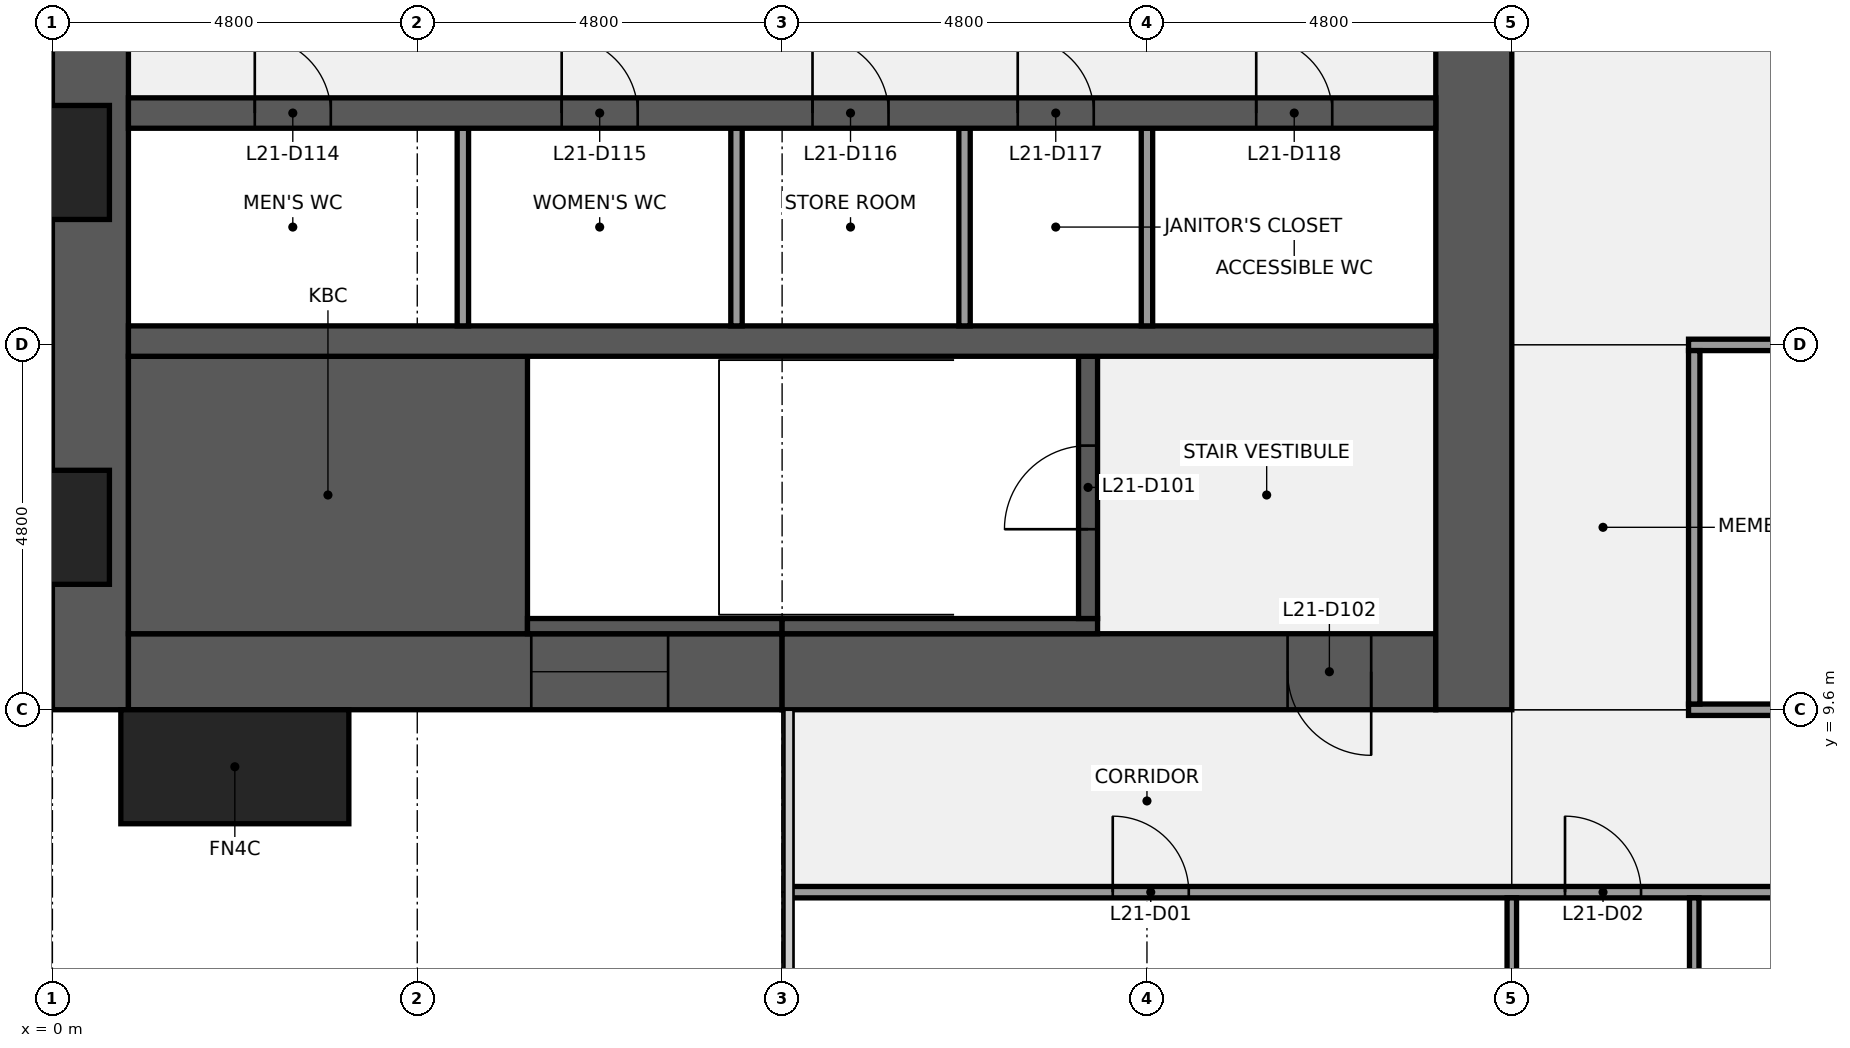
"""IFC4 building model, lengths in metres.
Left out: names, types, materials, properties, quantities, classifications, styles, units other than length and angle.
Written with IfcOpenShell. Run it as: python <this file> out.ifc"""

import sys

from ifc_helpers import new_model, si_unit, direction, frame, frame_2d, origin, origin_2d, place, context, subcontext, project, spatial, rectangle, extrude, element, fill, save


model = new_model("IFC4")
c1 = context("Model", 3, precision=1e-05, world=origin(), true_north=direction((0.0, 1.0)))
c2 = subcontext(c1, "Body", "Model", "MODEL_VIEW")
j1 = project(units=[si_unit("LENGTHUNIT", "METRE"), si_unit("PLANEANGLEUNIT", "RADIAN")], contexts=[c1])
p1 = place(None, origin())
s1 = spatial("IfcSite", under=j1, at=p1, CompositionType="ELEMENT")
p2 = place(p1, origin())
s2 = spatial("IfcBuilding", under=s1, at=p2, CompositionType="ELEMENT")
p3 = place(p2, frame((0.0, 0.0, 104.1)))
s3 = spatial("IfcBuildingStorey", under=s2, at=p3, CompositionType="ELEMENT", Elevation=104.1)
p4 = place(p3, frame((0.5, 9.6, 0.0), z_axis=(0.0, 0.0, 1.0), x_axis=(0.0, 1.0, 0.0)))
e1 = element("IfcWall", 1, at=p4, inside=s3, PredefinedType="SHEAR", context=c2, shape_type="SweptSolid", body=[
    extrude(rectangle(XDim=28.8, YDim=1.0, at=frame_2d((14.4, 0.0))), origin(), (0.0, 0.0, 1.0), 3.84),
])
p5 = place(p4, frame((8.85, 0.0, 0.9)))
e2 = element("IfcOpeningElement", 2, at=p5, cuts=e1, PredefinedType="OPENING", context=c2, shape_type="SweptSolid", body=[
    extrude(rectangle(XDim=1.5, YDim=1.5, at=frame_2d((0.75, 0.75))), frame((0.0, 0.51, 0.0), z_axis=(0.0, -1.0, 0.0), x_axis=(1.0, 0.0, 0.0)), (0.0, 0.0, 1.0), 1.02),
])
p6 = place(p4, frame((18.45, 0.0, 0.9)))
e3 = element("IfcOpeningElement", 3, at=p6, cuts=e1, PredefinedType="OPENING", context=c2, shape_type="SweptSolid", body=[
    extrude(rectangle(XDim=1.5, YDim=1.5, at=frame_2d((0.75, 0.75))), frame((0.0, 0.51, 0.0), z_axis=(0.0, -1.0, 0.0), x_axis=(1.0, 0.0, 0.0)), (0.0, 0.0, 1.0), 1.02),
])
p7 = place(p3, frame((9.6, 10.1, 0.0), z_axis=(0.0, 0.0, 1.0), x_axis=(-1.0, 0.0, 0.0)))
e4 = element("IfcWall", 4, at=p7, inside=s3, PredefinedType="SHEAR", context=c2, shape_type="SweptSolid", body=[
    extrude(rectangle(XDim=8.6, YDim=1.0, at=frame_2d((4.3, 0.0))), origin(), (0.0, 0.0, 1.0), 3.84),
])
p8 = place(p7, frame((1.5, 0.0, 0.9)))
e5 = element("IfcOpeningElement", 5, at=p8, cuts=e4, PredefinedType="OPENING", context=c2, shape_type="SweptSolid", body=[
    extrude(rectangle(XDim=1.8, YDim=1.5, at=frame_2d((0.9, 0.75))), frame((0.0, 0.51, 0.0), z_axis=(0.0, -1.0, 0.0), x_axis=(1.0, 0.0, 0.0)), (0.0, 0.0, 1.0), 1.02),
])
p9 = place(p3, frame((18.2, 10.1, 0.0), z_axis=(0.0, 0.0, 1.0), x_axis=(-1.0, 0.0, 0.0)))
e6 = element("IfcWall", 6, at=p9, inside=s3, PredefinedType="SHEAR", context=c2, shape_type="SweptSolid", body=[
    extrude(rectangle(XDim=8.6, YDim=1.0, at=frame_2d((4.3, 0.0))), origin(), (0.0, 0.0, 1.0), 3.84),
])
p10 = place(p9, frame((0.85, 0.0, 0.0)))
e7 = element("IfcOpeningElement", 7, at=p10, cuts=e6, PredefinedType="OPENING", context=c2, shape_type="SweptSolid", body=[
    extrude(rectangle(XDim=1.1, YDim=2.1, at=frame_2d((0.55, 1.05))), frame((0.0, 0.51, 0.0), z_axis=(0.0, -1.0, 0.0), x_axis=(1.0, 0.0, 0.0)), (0.0, 0.0, 1.0), 1.02),
])
p11 = place(p3, frame((18.7, 38.4, 0.0), z_axis=(0.0, 0.0, 1.0), x_axis=(0.0, -1.0, 0.0)))
e8 = element("IfcWall", 8, at=p11, inside=s3, PredefinedType="SHEAR", context=c2, shape_type="SweptSolid", body=[
    extrude(rectangle(XDim=28.8, YDim=1.0, at=frame_2d((14.4, 0.0))), origin(), (0.0, 0.0, 1.0), 3.84),
])
p12 = place(p11, frame((18.3, 0.0, 0.0)))
e9 = element("IfcOpeningElement", 9, at=p12, cuts=e8, PredefinedType="OPENING", context=c2, shape_type="SweptSolid", body=[
    extrude(rectangle(XDim=1.8, YDim=2.1, at=frame_2d((0.9, 1.05))), frame((0.0, 0.51, 0.0), z_axis=(0.0, -1.0, 0.0), x_axis=(1.0, 0.0, 0.0)), (0.0, 0.0, 1.0), 1.02),
])
p13 = place(p11, frame((8.7, 0.0, 0.0)))
e10 = element("IfcOpeningElement", 10, at=p13, cuts=e8, PredefinedType="OPENING", context=c2, shape_type="SweptSolid", body=[
    extrude(rectangle(XDim=1.8, YDim=2.1, at=frame_2d((0.9, 1.05))), frame((0.0, 0.51, 0.0), z_axis=(0.0, -1.0, 0.0), x_axis=(1.0, 0.0, 0.0)), (0.0, 0.0, 1.0), 1.02),
])
p14 = place(p3, frame((1.0, 12.425, 0.0), z_axis=(0.0, 0.0, 1.0), x_axis=(1.0, 0.0, 0.0)))
e11 = element("IfcWall", 11, at=p14, inside=s3, PredefinedType="SHEAR", context=c2, shape_type="SweptSolid", body=[
    extrude(rectangle(XDim=5.25, YDim=3.65, at=frame_2d((2.625, 0.0))), origin(), (0.0, 0.0, 1.0), 3.84),
])
p15 = place(p3, frame((6.25, 10.7, 0.0), z_axis=(0.0, 0.0, 1.0), x_axis=(1.0, 0.0, 0.0)))
e12 = element("IfcWall", 12, at=p15, inside=s3, PredefinedType="SHEAR", context=c2, shape_type="SweptSolid", body=[
    extrude(rectangle(XDim=3.35, YDim=0.2, at=frame_2d((1.675, 0.0))), origin(), (0.0, 0.0, 1.0), 3.84),
])
p16 = place(p3, frame((9.6, 10.7, 0.0), z_axis=(0.0, 0.0, 1.0), x_axis=(1.0, 0.0, 0.0)))
e13 = element("IfcWall", 13, at=p16, inside=s3, PredefinedType="SHEAR", context=c2, shape_type="SweptSolid", body=[
    extrude(rectangle(XDim=4.15, YDim=0.2, at=frame_2d((2.075, 0.0))), origin(), (0.0, 0.0, 1.0), 3.84),
])
p17 = place(p3, frame((13.625, 10.8, 0.0), z_axis=(0.0, 0.0, 1.0), x_axis=(0.0, 1.0, 0.0)))
e14 = element("IfcWall", 14, at=p17, inside=s3, PredefinedType="SHEAR", context=c2, shape_type="SweptSolid", body=[
    extrude(rectangle(XDim=3.45, YDim=0.25, at=frame_2d((1.725, 0.0))), origin(), (0.0, 0.0, 1.0), 3.84),
])
p18 = place(p17, frame((1.175, 0.0, 0.0)))
e15 = element("IfcOpeningElement", 15, at=p18, cuts=e14, PredefinedType="OPENING", context=c2, shape_type="SweptSolid", body=[
    extrude(rectangle(XDim=1.1, YDim=2.1, at=frame_2d((0.55, 1.05))), frame((0.0, 0.135, 0.0), z_axis=(0.0, -1.0, 0.0), x_axis=(1.0, 0.0, 0.0)), (0.0, 0.0, 1.0), 0.27),
])
p19 = place(p3, frame((1.0, 14.45, 0.0), z_axis=(0.0, 0.0, 1.0), x_axis=(1.0, 0.0, 0.0)))
e16 = element("IfcWall", 16, at=p19, inside=s3, PredefinedType="SHEAR", context=c2, shape_type="SweptSolid", body=[
    extrude(rectangle(XDim=17.2, YDim=0.4, at=frame_2d((8.6, 0.0))), origin(), (0.0, 0.0, 1.0), 3.84),
])
for number, where, z_axis, x_axis in (
    (17, (5.4, 14.65, 0.0), (0.0, 0.0, 1.0), (0.0, 1.0, 0.0)),
    (18, (9.0, 14.65, 0.0), (0.0, 0.0, 1.0), (0.0, 1.0, 0.0)),
    (19, (12.0, 14.65, 0.0), (0.0, 0.0, 1.0), (0.0, 1.0, 0.0)),
    (20, (14.4, 14.65, 0.0), (0.0, 0.0, 1.0), (0.0, 1.0, 0.0)),
):
    element("IfcWall", number, at=place(p3, frame(where, z_axis=z_axis, x_axis=x_axis)), inside=s3, PredefinedType="PARTITIONING", context=c2, shape_type="SweptSolid", body=[
        extrude(rectangle(XDim=2.6, YDim=0.15, at=frame_2d((1.3, 0.0))), origin(), (0.0, 0.0, 1.0), 3.84),
    ])
p20 = place(p3, frame((1.0, 17.45, 0.0), z_axis=(0.0, 0.0, 1.0), x_axis=(1.0, 0.0, 0.0)))
e21 = element("IfcWall", 21, at=p20, inside=s3, PredefinedType="SHEAR", context=c2, shape_type="SweptSolid", body=[
    extrude(rectangle(XDim=17.2, YDim=0.4, at=frame_2d((8.6, 0.0))), origin(), (0.0, 0.0, 1.0), 3.84),
])
p21 = place(p20, frame((1.663, 0.0, 0.0)))
e22 = element("IfcOpeningElement", 22, at=p21, cuts=e21, PredefinedType="OPENING", context=c2, shape_type="SweptSolid", body=[
    extrude(rectangle(XDim=1.0, YDim=2.1, at=frame_2d((0.5, 1.05))), frame((0.0, 0.21, 0.0), z_axis=(0.0, -1.0, 0.0), x_axis=(1.0, 0.0, 0.0)), (0.0, 0.0, 1.0), 0.42),
])
p22 = place(p20, frame((5.7, 0.0, 0.0)))
e23 = element("IfcOpeningElement", 23, at=p22, cuts=e21, PredefinedType="OPENING", context=c2, shape_type="SweptSolid", body=[
    extrude(rectangle(XDim=1.0, YDim=2.1, at=frame_2d((0.5, 1.05))), frame((0.0, 0.21, 0.0), z_axis=(0.0, -1.0, 0.0), x_axis=(1.0, 0.0, 0.0)), (0.0, 0.0, 1.0), 0.42),
])
p23 = place(p20, frame((9.0, 0.0, 0.0)))
e24 = element("IfcOpeningElement", 24, at=p23, cuts=e21, PredefinedType="OPENING", context=c2, shape_type="SweptSolid", body=[
    extrude(rectangle(XDim=1.0, YDim=2.1, at=frame_2d((0.5, 1.05))), frame((0.0, 0.21, 0.0), z_axis=(0.0, -1.0, 0.0), x_axis=(1.0, 0.0, 0.0)), (0.0, 0.0, 1.0), 0.42),
])
p24 = place(p20, frame((11.7, 0.0, 0.0)))
e25 = element("IfcOpeningElement", 25, at=p24, cuts=e21, PredefinedType="OPENING", context=c2, shape_type="SweptSolid", body=[
    extrude(rectangle(XDim=1.0, YDim=2.1, at=frame_2d((0.5, 1.05))), frame((0.0, 0.21, 0.0), z_axis=(0.0, -1.0, 0.0), x_axis=(1.0, 0.0, 0.0)), (0.0, 0.0, 1.0), 0.42),
])
p25 = place(p20, frame((14.837, 0.0, 0.0)))
e26 = element("IfcOpeningElement", 26, at=p25, cuts=e21, PredefinedType="OPENING", context=c2, shape_type="SweptSolid", body=[
    extrude(rectangle(XDim=1.0, YDim=2.1, at=frame_2d((0.5, 1.05))), frame((0.0, 0.21, 0.0), z_axis=(0.0, -1.0, 0.0), x_axis=(1.0, 0.0, 0.0)), (0.0, 0.0, 1.0), 0.42),
])
p26 = place(p3, frame((9.7, 7.2, 0.0), z_axis=(0.0, 0.0, 1.0), x_axis=(1.0, 0.0, 0.0)))
e27 = element("IfcWall", 27, at=p26, inside=s3, PredefinedType="PARTITIONING", context=c2, shape_type="SweptSolid", body=[
    extrude(rectangle(XDim=38.375, YDim=0.15, at=frame_2d((19.188, 0.0))), origin(), (0.0, 0.0, 1.0), 2.936),
])
p27 = place(p26, frame((4.25, 0.0, 0.0)))
e28 = element("IfcOpeningElement", 28, at=p27, cuts=e27, PredefinedType="OPENING", context=c2, shape_type="SweptSolid", body=[
    extrude(rectangle(XDim=1.0, YDim=2.1, at=frame_2d((0.5, 1.05))), frame((0.0, 0.085, 0.0), z_axis=(0.0, -1.0, 0.0), x_axis=(1.0, 0.0, 0.0)), (0.0, 0.0, 1.0), 0.17),
])
p28 = place(p26, frame((10.2, 0.0, 0.0)))
e29 = element("IfcOpeningElement", 29, at=p28, cuts=e27, PredefinedType="OPENING", context=c2, shape_type="SweptSolid", body=[
    extrude(rectangle(XDim=1.0, YDim=2.1, at=frame_2d((0.5, 1.05))), frame((0.0, 0.085, 0.0), z_axis=(0.0, -1.0, 0.0), x_axis=(1.0, 0.0, 0.0)), (0.0, 0.0, 1.0), 0.17),
])
p29 = place(p26, frame((13.8, 0.0, 0.0)))
e30 = element("IfcOpeningElement", 30, at=p29, cuts=e27, PredefinedType="OPENING", context=c2, shape_type="SweptSolid", body=[
    extrude(rectangle(XDim=1.0, YDim=2.1, at=frame_2d((0.5, 1.05))), frame((0.0, 0.085, 0.0), z_axis=(0.0, -1.0, 0.0), x_axis=(1.0, 0.0, 0.0)), (0.0, 0.0, 1.0), 0.17),
])
p30 = place(p26, frame((17.4, 0.0, 0.0)))
e31 = element("IfcOpeningElement", 31, at=p30, cuts=e27, PredefinedType="OPENING", context=c2, shape_type="SweptSolid", body=[
    extrude(rectangle(XDim=1.0, YDim=2.1, at=frame_2d((0.5, 1.05))), frame((0.0, 0.085, 0.0), z_axis=(0.0, -1.0, 0.0), x_axis=(1.0, 0.0, 0.0)), (0.0, 0.0, 1.0), 0.17),
])
p31 = place(p26, frame((23.4, 0.0, 0.0)))
e32 = element("IfcOpeningElement", 32, at=p31, cuts=e27, PredefinedType="OPENING", context=c2, shape_type="SweptSolid", body=[
    extrude(rectangle(XDim=1.0, YDim=2.1, at=frame_2d((0.5, 1.05))), frame((0.0, 0.085, 0.0), z_axis=(0.0, -1.0, 0.0), x_axis=(1.0, 0.0, 0.0)), (0.0, 0.0, 1.0), 0.17),
])
p32 = place(p26, frame((33.0, 0.0, 0.0)))
e33 = element("IfcOpeningElement", 33, at=p32, cuts=e27, PredefinedType="OPENING", context=c2, shape_type="SweptSolid", body=[
    extrude(rectangle(XDim=1.0, YDim=2.1, at=frame_2d((0.5, 1.05))), frame((0.0, 0.085, 0.0), z_axis=(0.0, -1.0, 0.0), x_axis=(1.0, 0.0, 0.0)), (0.0, 0.0, 1.0), 0.17),
])
p33 = place(p3, frame((21.525, 9.6, 0.0), z_axis=(0.0, 0.0, 1.0), x_axis=(1.0, 0.0, 0.0)))
e34 = element("IfcWall", 34, at=p33, inside=s3, PredefinedType="PARTITIONING", context=c2, shape_type="SweptSolid", body=[
    extrude(rectangle(XDim=14.55, YDim=0.15, at=frame_2d((7.275, 0.0))), origin(), (0.0, 0.0, 1.0), 2.936),
])
p34 = place(p33, frame((3.175, 0.0, 0.0)))
e35 = element("IfcOpeningElement", 35, at=p34, cuts=e34, PredefinedType="OPENING", context=c2, shape_type="SweptSolid", body=[
    extrude(rectangle(XDim=1.0, YDim=2.1, at=frame_2d((0.5, 1.05))), frame((0.0, 0.085, 0.0), z_axis=(0.0, -1.0, 0.0), x_axis=(1.0, 0.0, 0.0)), (0.0, 0.0, 1.0), 0.17),
])
p35 = place(p33, frame((10.375, 0.0, 0.0)))
e36 = element("IfcOpeningElement", 36, at=p35, cuts=e34, PredefinedType="OPENING", context=c2, shape_type="SweptSolid", body=[
    extrude(rectangle(XDim=1.0, YDim=2.1, at=frame_2d((0.5, 1.05))), frame((0.0, 0.085, 0.0), z_axis=(0.0, -1.0, 0.0), x_axis=(1.0, 0.0, 0.0)), (0.0, 0.0, 1.0), 0.17),
])
p36 = place(p3, frame((21.525, 14.4, 0.0), z_axis=(0.0, 0.0, 1.0), x_axis=(1.0, 0.0, 0.0)))
e37 = element("IfcWall", 37, at=p36, inside=s3, PredefinedType="PARTITIONING", context=c2, shape_type="SweptSolid", body=[
    extrude(rectangle(XDim=4.95, YDim=0.15, at=frame_2d((2.475, 0.0))), origin(), (0.0, 0.0, 1.0), 2.936),
])
p37 = place(p3, frame((19.2, 0.6, 0.0), z_axis=(0.0, 0.0, 1.0), x_axis=(0.0, 1.0, 0.0)))
e38 = element("IfcWall", 38, at=p37, inside=s3, PredefinedType="PARTITIONING", context=c2, shape_type="SweptSolid", body=[
    extrude(rectangle(XDim=6.525, YDim=0.125, at=frame_2d((3.262, 0.0))), origin(), (0.0, 0.0, 1.0), 2.936),
])
p38 = place(p3, frame((21.6, 0.1, 0.0), z_axis=(0.0, 0.0, 1.0), x_axis=(0.0, 1.0, 0.0)))
e39 = element("IfcWall", 39, at=p38, inside=s3, PredefinedType="PARTITIONING", context=c2, shape_type="SweptSolid", body=[
    extrude(rectangle(XDim=7.025, YDim=0.125, at=frame_2d((3.512, 0.0))), origin(), (0.0, 0.0, 1.0), 2.936),
])
p39 = place(p3, frame((21.6, 9.675, 0.0), z_axis=(0.0, 0.0, 1.0), x_axis=(0.0, 1.0, 0.0)))
e40 = element("IfcWall", 40, at=p39, inside=s3, PredefinedType="PARTITIONING", context=c2, shape_type="SweptSolid", body=[
    extrude(rectangle(XDim=4.65, YDim=0.15, at=frame_2d((2.325, 0.0))), origin(), (0.0, 0.0, 1.0), 2.936),
])
p40 = place(p3, frame((2.4, 8.85, 0.0), z_axis=(0.0, 0.0, 1.0), x_axis=(1.0, 0.0, 0.0)))
e41 = element("IfcColumn", 41, at=p40, inside=s3, PredefinedType="PILASTER", context=c2, shape_type="SweptSolid", body=[
    extrude(rectangle(XDim=3.0, YDim=1.5, at=origin_2d()), origin(), (0.0, 0.0, 1.0), 4.0),
])
p41 = place(p18, origin())
e42 = element("IfcDoor", 42, at=p41, inside=s3, OperationType="SINGLE_SWING_LEFT", PredefinedType="DOOR", context=c2, shape_type="SweptSolid", body=[
    extrude(rectangle(XDim=1.1, YDim=2.1, at=frame_2d((0.55, 1.05))), frame((0.0, 0.025, 0.0), z_axis=(0.0, -1.0, 0.0), x_axis=(1.0, 0.0, 0.0)), (0.0, 0.0, 1.0), 0.05),
])
fill(e15, e42)
p42 = place(p10, origin())
e43 = element("IfcDoor", 43, at=p42, inside=s3, OperationType="SINGLE_SWING_LEFT", PredefinedType="DOOR", context=c2, shape_type="SweptSolid", body=[
    extrude(rectangle(XDim=1.1, YDim=2.1, at=frame_2d((0.55, 1.05))), frame((0.0, 0.025, 0.0), z_axis=(0.0, -1.0, 0.0), x_axis=(1.0, 0.0, 0.0)), (0.0, 0.0, 1.0), 0.05),
])
fill(e7, e43)
p43 = place(p21, origin())
e44 = element("IfcDoor", 44, at=p43, inside=s3, OperationType="SINGLE_SWING_LEFT", PredefinedType="DOOR", context=c2, shape_type="SweptSolid", body=[
    extrude(rectangle(XDim=1.0, YDim=2.1, at=frame_2d((0.5, 1.05))), frame((0.0, 0.025, 0.0), z_axis=(0.0, -1.0, 0.0), x_axis=(1.0, 0.0, 0.0)), (0.0, 0.0, 1.0), 0.05),
])
fill(e22, e44)
p44 = place(p22, origin())
e45 = element("IfcDoor", 45, at=p44, inside=s3, OperationType="SINGLE_SWING_LEFT", PredefinedType="DOOR", context=c2, shape_type="SweptSolid", body=[
    extrude(rectangle(XDim=1.0, YDim=2.1, at=frame_2d((0.5, 1.05))), frame((0.0, 0.025, 0.0), z_axis=(0.0, -1.0, 0.0), x_axis=(1.0, 0.0, 0.0)), (0.0, 0.0, 1.0), 0.05),
])
fill(e23, e45)
p45 = place(p23, origin())
e46 = element("IfcDoor", 46, at=p45, inside=s3, OperationType="SINGLE_SWING_LEFT", PredefinedType="DOOR", context=c2, shape_type="SweptSolid", body=[
    extrude(rectangle(XDim=1.0, YDim=2.1, at=frame_2d((0.5, 1.05))), frame((0.0, 0.025, 0.0), z_axis=(0.0, -1.0, 0.0), x_axis=(1.0, 0.0, 0.0)), (0.0, 0.0, 1.0), 0.05),
])
fill(e24, e46)
p46 = place(p24, origin())
e47 = element("IfcDoor", 47, at=p46, inside=s3, OperationType="SINGLE_SWING_LEFT", PredefinedType="DOOR", context=c2, shape_type="SweptSolid", body=[
    extrude(rectangle(XDim=1.0, YDim=2.1, at=frame_2d((0.5, 1.05))), frame((0.0, 0.025, 0.0), z_axis=(0.0, -1.0, 0.0), x_axis=(1.0, 0.0, 0.0)), (0.0, 0.0, 1.0), 0.05),
])
fill(e25, e47)
p47 = place(p25, origin())
e48 = element("IfcDoor", 48, at=p47, inside=s3, OperationType="SINGLE_SWING_LEFT", PredefinedType="DOOR", context=c2, shape_type="SweptSolid", body=[
    extrude(rectangle(XDim=1.0, YDim=2.1, at=frame_2d((0.5, 1.05))), frame((0.0, 0.025, 0.0), z_axis=(0.0, -1.0, 0.0), x_axis=(1.0, 0.0, 0.0)), (0.0, 0.0, 1.0), 0.05),
])
fill(e26, e48)
p48 = place(p8, origin())
e49 = element("IfcWindow", 49, at=p48, inside=s3, PartitioningType="SINGLE_PANEL", PredefinedType="WINDOW", context=c2, shape_type="SweptSolid", body=[
    extrude(rectangle(XDim=1.8, YDim=1.5, at=frame_2d((0.9, 0.75))), frame((0.0, 0.03, 0.0), z_axis=(0.0, -1.0, 0.0), x_axis=(1.0, 0.0, 0.0)), (0.0, 0.0, 1.0), 0.06),
])
fill(e5, e49)
p49 = place(p27, origin())
e50 = element("IfcDoor", 50, at=p49, inside=s3, OperationType="SINGLE_SWING_LEFT", PredefinedType="DOOR", context=c2, shape_type="SweptSolid", body=[
    extrude(rectangle(XDim=1.0, YDim=2.1, at=frame_2d((0.5, 1.05))), frame((0.0, 0.025, 0.0), z_axis=(0.0, -1.0, 0.0), x_axis=(1.0, 0.0, 0.0)), (0.0, 0.0, 1.0), 0.05),
])
fill(e28, e50)
p50 = place(p28, origin())
e51 = element("IfcDoor", 51, at=p50, inside=s3, OperationType="SINGLE_SWING_LEFT", PredefinedType="DOOR", context=c2, shape_type="SweptSolid", body=[
    extrude(rectangle(XDim=1.0, YDim=2.1, at=frame_2d((0.5, 1.05))), frame((0.0, 0.025, 0.0), z_axis=(0.0, -1.0, 0.0), x_axis=(1.0, 0.0, 0.0)), (0.0, 0.0, 1.0), 0.05),
])
fill(e29, e51)
save(model, sys.argv[1])
